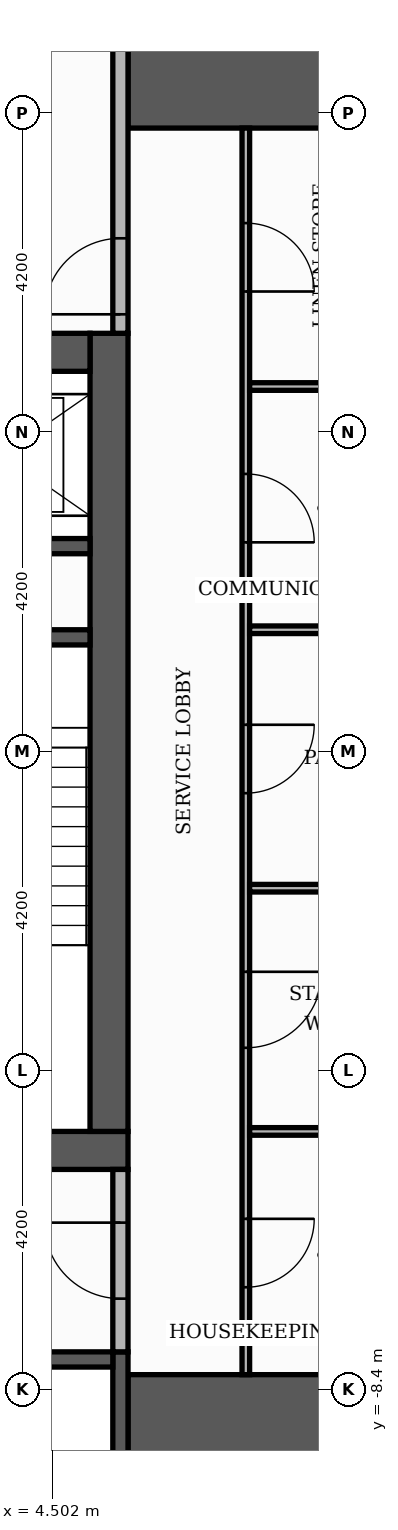
"""IFC4 building model, lengths in metres.
Left out: names, types, materials, properties, quantities, classifications, styles, units other than length and angle.
Written with IfcOpenShell. Run it as: python <this file> out.ifc"""

import sys

from ifc_helpers import new_model, si_unit, direction, frame, frame_2d, origin, place, context, subcontext, project, spatial, rectangle, extrude, element, fill, save


model = new_model("IFC4")
c1 = context("Model", 3, precision=1e-05, world=origin(), true_north=direction((0.0, 1.0)))
c2 = subcontext(c1, "Body", "Model", "MODEL_VIEW")
j1 = project(units=[si_unit("LENGTHUNIT", "METRE"), si_unit("PLANEANGLEUNIT", "RADIAN")], contexts=[c1])
p1 = place(None, origin())
s1 = spatial("IfcSite", under=j1, at=p1, CompositionType="ELEMENT")
p2 = place(p1, origin())
s2 = spatial("IfcBuilding", under=s1, at=p2, CompositionType="ELEMENT")
p3 = place(p2, frame((0.0, 0.0, 42.6)))
s3 = spatial("IfcBuildingStorey", under=s2, at=p3, CompositionType="ELEMENT", Elevation=42.6)
p4 = place(p3, frame((-5.5, -5.25, 0.0), z_axis=(0.0, 0.0, 1.0), x_axis=(1.0, 0.0, 0.0)))
e1 = element("IfcWall", 1, at=p4, inside=s3, PredefinedType="SHEAR", context=c2, shape_type="SweptSolid", body=[
    extrude(rectangle(XDim=11.0, YDim=0.5, at=frame_2d((5.5, 0.0))), origin(), (0.0, 0.0, 1.0), 3.48),
])
p5 = place(p4, frame((4.9, 0.0, 0.0)))
e2 = element("IfcOpeningElement", 2, at=p5, cuts=e1, PredefinedType="OPENING", context=c2, shape_type="SweptSolid", body=[
    extrude(rectangle(XDim=1.2, YDim=2.1, at=frame_2d((0.6, 1.05))), frame((0.0, 0.26, 0.0), z_axis=(0.0, -1.0, 0.0), x_axis=(1.0, 0.0, 0.0)), (0.0, 0.0, 1.0), 0.52),
])
p6 = place(p3, frame((5.25, -5.0, 0.0), z_axis=(0.0, 0.0, 1.0), x_axis=(0.0, 1.0, 0.0)))
e3 = element("IfcWall", 3, at=p6, inside=s3, PredefinedType="SHEAR", context=c2, shape_type="SweptSolid", body=[
    extrude(rectangle(XDim=10.5, YDim=0.5, at=frame_2d((5.25, 0.0))), origin(), (0.0, 0.0, 1.0), 3.48),
])
p7 = place(p3, frame((-5.0, 5.25, 0.0), z_axis=(0.0, 0.0, 1.0), x_axis=(1.0, 0.0, 0.0)))
e4 = element("IfcWall", 4, at=p7, inside=s3, PredefinedType="SHEAR", context=c2, shape_type="SweptSolid", body=[
    extrude(rectangle(XDim=10.0, YDim=0.5, at=frame_2d((5.0, 0.0))), origin(), (0.0, 0.0, 1.0), 3.48),
])
p8 = place(p7, frame((4.4, 0.0, 0.0)))
e5 = element("IfcOpeningElement", 5, at=p8, cuts=e4, PredefinedType="OPENING", context=c2, shape_type="SweptSolid", body=[
    extrude(rectangle(XDim=1.2, YDim=2.1, at=frame_2d((0.6, 1.05))), frame((0.0, 0.26, 0.0), z_axis=(0.0, -1.0, 0.0), x_axis=(1.0, 0.0, 0.0)), (0.0, 0.0, 1.0), 0.52),
])
for number, where, z_axis, x_axis in (
    (6, (5.5, -9.15, 0.0), (0.0, 0.0, 1.0), (1.0, 0.0, 0.0)),
    (7, (5.5, 9.15, 0.0), (0.0, 0.0, 1.0), (1.0, 0.0, 0.0)),
):
    element("IfcWall", number, at=place(p3, frame(where, z_axis=z_axis, x_axis=x_axis)), inside=s3, PredefinedType="SHEAR", context=c2, shape_type="SweptSolid", body=[
        extrude(rectangle(XDim=4.6, YDim=1.9, at=frame_2d((2.3, 0.0))), origin(), (0.0, 0.0, 1.0), 3.48),
    ])
p9 = place(p3, frame((2.15, 1.5, 0.0), z_axis=(0.0, 0.0, 1.0), x_axis=(1.0, 0.0, 0.0)))
e8 = element("IfcWall", 8, at=p9, inside=s3, PredefinedType="SHEAR", context=c2, shape_type="SweptSolid", body=[
    extrude(rectangle(XDim=2.85, YDim=0.2, at=frame_2d((1.425, 0.0))), origin(), (0.0, 0.0, 1.0), 3.48),
])
p10 = place(p3, frame((5.4, -10.1, 0.0), z_axis=(0.0, 0.0, 1.0), x_axis=(0.0, 1.0, 0.0)))
e9 = element("IfcWall", 9, at=p10, inside=s3, PredefinedType="SHEAR", context=c2, shape_type="SweptSolid", body=[
    extrude(rectangle(XDim=2.2, YDim=0.2, at=frame_2d((1.1, 0.0))), origin(), (0.0, 0.0, 1.0), 3.48),
])
p11 = place(p3, frame((2.8, -8.0, 0.0), z_axis=(0.0, 0.0, 1.0), x_axis=(1.0, 0.0, 0.0)))
e10 = element("IfcWall", 10, at=p11, inside=s3, PredefinedType="SHEAR", context=c2, shape_type="SweptSolid", body=[
    extrude(rectangle(XDim=2.5, YDim=0.2, at=frame_2d((1.25, 0.0))), origin(), (0.0, 0.0, 1.0), 3.48),
])
p12 = place(p3, frame((2.15, 2.7, 0.0), z_axis=(0.0, 0.0, 1.0), x_axis=(1.0, 0.0, 0.0)))
e11 = element("IfcWall", 11, at=p12, inside=s3, PredefinedType="SHEAR", context=c2, shape_type="SweptSolid", body=[
    extrude(rectangle(XDim=2.85, YDim=0.2, at=frame_2d((1.425, 0.0))), origin(), (0.0, 0.0, 1.0), 3.48),
])
p13 = place(p3, frame((7.05, -8.2, 0.0), z_axis=(0.0, 0.0, 1.0), x_axis=(0.0, 1.0, 0.0)))
e12 = element("IfcWall", 12, at=p13, inside=s3, PredefinedType="PARTITIONING", context=c2, shape_type="SweptSolid", body=[
    extrude(rectangle(XDim=16.4, YDim=0.1, at=frame_2d((8.2, 0.0))), origin(), (0.0, 0.0, 1.0), 3.48),
])
p14 = place(p13, frame((1.15, 0.0, 0.0)))
e13 = element("IfcOpeningElement", 13, at=p14, cuts=e12, PredefinedType="OPENING", context=c2, shape_type="SweptSolid", body=[
    extrude(rectangle(XDim=0.9, YDim=2.1, at=frame_2d((0.45, 1.05))), frame((0.0, 0.06, 0.0), z_axis=(0.0, -1.0, 0.0), x_axis=(1.0, 0.0, 0.0)), (0.0, 0.0, 1.0), 0.12),
])
p15 = place(p13, frame((4.3, 0.0, 0.0)))
e14 = element("IfcOpeningElement", 14, at=p15, cuts=e12, PredefinedType="OPENING", context=c2, shape_type="SweptSolid", body=[
    extrude(rectangle(XDim=1.0, YDim=2.1, at=frame_2d((0.5, 1.05))), frame((0.0, 0.06, 0.0), z_axis=(0.0, -1.0, 0.0), x_axis=(1.0, 0.0, 0.0)), (0.0, 0.0, 1.0), 0.12),
])
p16 = place(p13, frame((7.65, 0.0, 0.0)))
e15 = element("IfcOpeningElement", 15, at=p16, cuts=e12, PredefinedType="OPENING", context=c2, shape_type="SweptSolid", body=[
    extrude(rectangle(XDim=0.9, YDim=2.1, at=frame_2d((0.45, 1.05))), frame((0.0, 0.06, 0.0), z_axis=(0.0, -1.0, 0.0), x_axis=(1.0, 0.0, 0.0)), (0.0, 0.0, 1.0), 0.12),
])
p17 = place(p13, frame((10.95, 0.0, 0.0)))
e16 = element("IfcOpeningElement", 16, at=p17, cuts=e12, PredefinedType="OPENING", context=c2, shape_type="SweptSolid", body=[
    extrude(rectangle(XDim=0.9, YDim=2.1, at=frame_2d((0.45, 1.05))), frame((0.0, 0.06, 0.0), z_axis=(0.0, -1.0, 0.0), x_axis=(1.0, 0.0, 0.0)), (0.0, 0.0, 1.0), 0.12),
])
p18 = place(p13, frame((14.25, 0.0, 0.0)))
e17 = element("IfcOpeningElement", 17, at=p18, cuts=e12, PredefinedType="OPENING", context=c2, shape_type="SweptSolid", body=[
    extrude(rectangle(XDim=0.9, YDim=2.1, at=frame_2d((0.45, 1.05))), frame((0.0, 0.06, 0.0), z_axis=(0.0, -1.0, 0.0), x_axis=(1.0, 0.0, 0.0)), (0.0, 0.0, 1.0), 0.12),
])
p19 = place(p3, frame((5.4, -7.9, 0.0), z_axis=(0.0, 0.0, 1.0), x_axis=(0.0, 1.0, 0.0)))
e18 = element("IfcWall", 18, at=p19, inside=s3, PredefinedType="PARTITIONING", context=c2, shape_type="SweptSolid", body=[
    extrude(rectangle(XDim=2.4, YDim=0.2, at=frame_2d((1.2, 0.0))), origin(), (0.0, 0.0, 1.0), 3.48),
])
p20 = place(p19, frame((0.7, 0.0, 0.0)))
e19 = element("IfcOpeningElement", 19, at=p20, cuts=e18, PredefinedType="OPENING", context=c2, shape_type="SweptSolid", body=[
    extrude(rectangle(XDim=1.0, YDim=2.1, at=frame_2d((0.5, 1.05))), frame((0.0, 0.11, 0.0), z_axis=(0.0, -1.0, 0.0), x_axis=(1.0, 0.0, 0.0)), (0.0, 0.0, 1.0), 0.22),
])
for number, where, z_axis, x_axis in (
    (20, (7.1, -5.0, 0.0), (0.0, 0.0, 1.0), (1.0, 0.0, 0.0)),
    (21, (7.1, -1.8, 0.0), (0.0, 0.0, 1.0), (1.0, 0.0, 0.0)),
    (22, (7.1, 1.6, 0.0), (0.0, 0.0, 1.0), (1.0, 0.0, 0.0)),
    (23, (7.1, 4.8, 0.0), (0.0, 0.0, 1.0), (1.0, 0.0, 0.0)),
):
    element("IfcWall", number, at=place(p3, frame(where, z_axis=z_axis, x_axis=x_axis)), inside=s3, PredefinedType="PARTITIONING", context=c2, shape_type="SweptSolid", body=[
        extrude(rectangle(XDim=1.9, YDim=0.1, at=frame_2d((0.95, 0.0))), origin(), (0.0, 0.0, 1.0), 3.48),
    ])
p21 = place(p3, frame((5.4, 5.5, 0.0), z_axis=(0.0, 0.0, 1.0), x_axis=(0.0, 1.0, 0.0)))
e24 = element("IfcWall", 24, at=p21, inside=s3, PredefinedType="PARTITIONING", context=c2, shape_type="SweptSolid", body=[
    extrude(rectangle(XDim=4.6, YDim=0.2, at=frame_2d((2.3, 0.0))), origin(), (0.0, 0.0, 1.0), 3.48),
])
p22 = place(p21, frame((0.25, 0.0, 0.0)))
e25 = element("IfcOpeningElement", 25, at=p22, cuts=e24, PredefinedType="OPENING", context=c2, shape_type="SweptSolid", body=[
    extrude(rectangle(XDim=1.0, YDim=2.1, at=frame_2d((0.5, 1.05))), frame((0.0, 0.11, 0.0), z_axis=(0.0, -1.0, 0.0), x_axis=(1.0, 0.0, 0.0)), (0.0, 0.0, 1.0), 0.22),
])
p23 = place(p22, origin())
e26 = element("IfcDoor", 26, at=p23, inside=s3, OperationType="SINGLE_SWING_LEFT", PredefinedType="DOOR", context=c2, shape_type="SweptSolid", body=[
    extrude(rectangle(XDim=1.0, YDim=2.1, at=frame_2d((0.5, 1.05))), frame((0.0, 0.025, 0.0), z_axis=(0.0, -1.0, 0.0), x_axis=(1.0, 0.0, 0.0)), (0.0, 0.0, 1.0), 0.05),
])
fill(e25, e26)
p24 = place(p20, origin())
e27 = element("IfcDoor", 27, at=p24, inside=s3, OperationType="SINGLE_SWING_RIGHT", PredefinedType="DOOR", context=c2, shape_type="SweptSolid", body=[
    extrude(rectangle(XDim=1.0, YDim=2.1, at=frame_2d((0.5, 1.05))), frame((0.0, 0.025, 0.0), z_axis=(0.0, -1.0, 0.0), x_axis=(1.0, 0.0, 0.0)), (0.0, 0.0, 1.0), 0.05),
])
fill(e19, e27)
p25 = place(p14, frame((0.9, 0.0, 0.0), z_axis=(0.0, 0.0, 1.0), x_axis=(-1.0, 0.0, 0.0)))
e28 = element("IfcDoor", 28, at=p25, inside=s3, OperationType="SINGLE_SWING_RIGHT", PredefinedType="DOOR", context=c2, shape_type="SweptSolid", body=[
    extrude(rectangle(XDim=0.9, YDim=2.1, at=frame_2d((0.45, 1.05))), frame((0.0, 0.025, 0.0), z_axis=(0.0, -1.0, 0.0), x_axis=(1.0, 0.0, 0.0)), (0.0, 0.0, 1.0), 0.05),
])
fill(e13, e28)
p26 = place(p15, frame((1.0, 0.0, 0.0), z_axis=(0.0, 0.0, 1.0), x_axis=(-1.0, 0.0, 0.0)))
e29 = element("IfcDoor", 29, at=p26, inside=s3, OperationType="SINGLE_SWING_RIGHT", PredefinedType="DOOR", context=c2, shape_type="SweptSolid", body=[
    extrude(rectangle(XDim=1.0, YDim=2.1, at=frame_2d((0.5, 1.05))), frame((0.0, 0.025, 0.0), z_axis=(0.0, -1.0, 0.0), x_axis=(1.0, 0.0, 0.0)), (0.0, 0.0, 1.0), 0.05),
])
fill(e14, e29)
p27 = place(p16, frame((0.9, 0.0, 0.0), z_axis=(0.0, 0.0, 1.0), x_axis=(-1.0, 0.0, 0.0)))
e30 = element("IfcDoor", 30, at=p27, inside=s3, OperationType="SINGLE_SWING_RIGHT", PredefinedType="DOOR", context=c2, shape_type="SweptSolid", body=[
    extrude(rectangle(XDim=0.9, YDim=2.1, at=frame_2d((0.45, 1.05))), frame((0.0, 0.025, 0.0), z_axis=(0.0, -1.0, 0.0), x_axis=(1.0, 0.0, 0.0)), (0.0, 0.0, 1.0), 0.05),
])
fill(e15, e30)
p28 = place(p17, frame((0.9, 0.0, 0.0), z_axis=(0.0, 0.0, 1.0), x_axis=(-1.0, 0.0, 0.0)))
e31 = element("IfcDoor", 31, at=p28, inside=s3, OperationType="SINGLE_SWING_LEFT", PredefinedType="DOOR", context=c2, shape_type="SweptSolid", body=[
    extrude(rectangle(XDim=0.9, YDim=2.1, at=frame_2d((0.45, 1.05))), frame((0.0, 0.025, 0.0), z_axis=(0.0, -1.0, 0.0), x_axis=(1.0, 0.0, 0.0)), (0.0, 0.0, 1.0), 0.05),
])
fill(e16, e31)
p29 = place(p18, frame((0.9, 0.0, 0.0), z_axis=(0.0, 0.0, 1.0), x_axis=(-1.0, 0.0, 0.0)))
e32 = element("IfcDoor", 32, at=p29, inside=s3, OperationType="SINGLE_SWING_LEFT", PredefinedType="DOOR", context=c2, shape_type="SweptSolid", body=[
    extrude(rectangle(XDim=0.9, YDim=2.1, at=frame_2d((0.45, 1.05))), frame((0.0, 0.025, 0.0), z_axis=(0.0, -1.0, 0.0), x_axis=(1.0, 0.0, 0.0)), (0.0, 0.0, 1.0), 0.05),
])
fill(e17, e32)
save(model, sys.argv[1])
